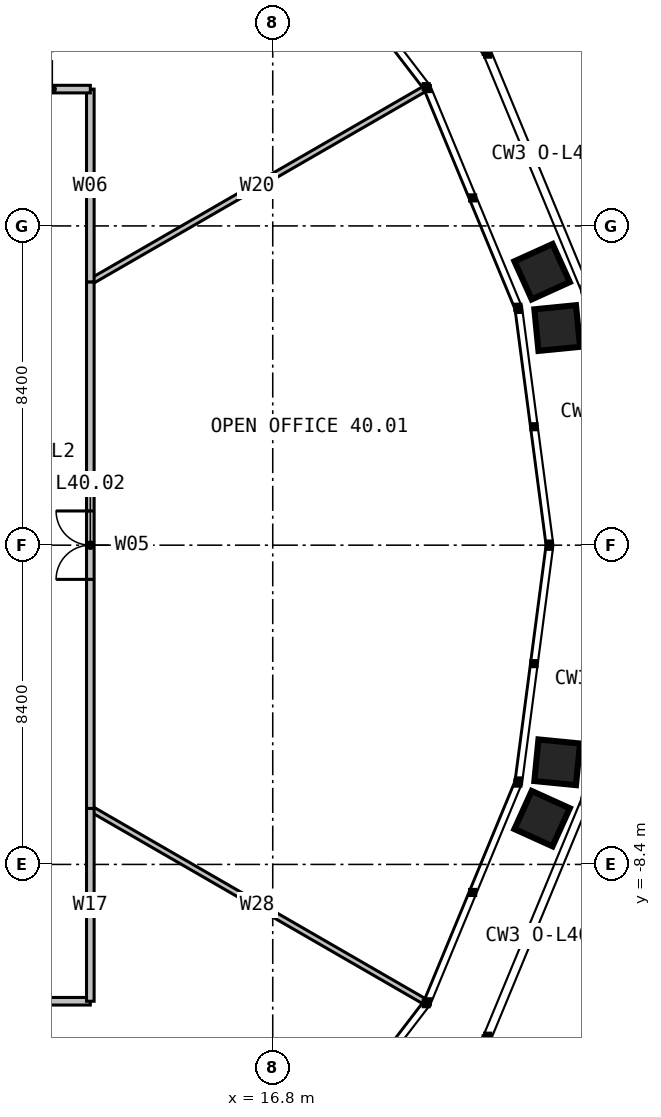
"""IFC4 building model, lengths in metres.
Left out: names, types, materials, properties, quantities, classifications, styles, units other than length and angle.
Written with IfcOpenShell. Run it as: python <this file> out.ifc"""

import sys

from ifc_helpers import new_model, si_unit, direction, frame, frame_2d, origin, place, context, subcontext, project, spatial, rectangle, extrude, element, fill, save


model = new_model("IFC4")
c1 = context("Model", 3, precision=1e-05, world=origin(), true_north=direction((0.0, 1.0)))
c2 = subcontext(c1, "Body", "Model", "MODEL_VIEW")
j1 = project(units=[si_unit("LENGTHUNIT", "METRE"), si_unit("PLANEANGLEUNIT", "RADIAN")], contexts=[c1])
p1 = place(None, origin())
s1 = spatial("IfcSite", under=j1, at=p1, CompositionType="ELEMENT")
p2 = place(p1, origin())
s2 = spatial("IfcBuilding", under=s1, at=p2, CompositionType="ELEMENT")
p3 = place(p2, frame((0.0, 0.0, 167.0)))
s3 = spatial("IfcBuildingStorey", under=s2, at=p3, CompositionType="ELEMENT", Elevation=167.0)
for number, where, z_axis, x_axis in (
    (1, (12.0, -6.928, 0.0), (0.0, 0.0, 1.0), (0.866, -0.5, 0.0)),
    (2, (12.0, 6.928, 0.0), (0.0, 0.0, 1.0), (0.866, 0.5, 0.0)),
    (3, (6.928, -12.0, 0.0), (0.0, 0.0, 1.0), (0.5, -0.866, 0.0)),
):
    element("IfcWall", number, at=place(p3, frame(where, z_axis=z_axis, x_axis=x_axis)), inside=s3, PredefinedType="PARTITIONING", context=c2, shape_type="SweptSolid", body=[
        extrude(rectangle(XDim=10.136, YDim=0.15, at=frame_2d((5.068, 0.0))), origin(), (0.0, 0.0, 1.0), 2.79),
    ])
p4 = place(p3, frame((12.0, -6.928, 0.0), z_axis=(0.0, 0.0, 1.0), x_axis=(0.0, 1.0, 0.0)))
e4 = element("IfcWall", 4, at=p4, inside=s3, PredefinedType="PARTITIONING", context=c2, shape_type="SweptSolid", body=[
    extrude(rectangle(XDim=13.856, YDim=0.2, at=frame_2d((6.928, 0.0))), origin(), (0.0, 0.0, 1.0), 3.8),
])
p5 = place(p4, frame((6.028, 0.0, 0.0)))
e5 = element("IfcOpeningElement", 5, at=p5, cuts=e4, PredefinedType="OPENING", context=c2, shape_type="SweptSolid", body=[
    extrude(rectangle(XDim=1.8, YDim=2.2, at=frame_2d((0.9, 1.1))), frame((0.0, 0.11, 0.0), z_axis=(0.0, -1.0, 0.0), x_axis=(1.0, 0.0, 0.0)), (0.0, 0.0, 1.0), 0.22),
])
p6 = place(p3, frame((12.0, 6.928, 0.0), z_axis=(0.0, 0.0, 1.0), x_axis=(0.0, 1.0, 0.0)))
e6 = element("IfcWall", 6, at=p6, inside=s3, PredefinedType="PARTITIONING", context=c2, shape_type="SweptSolid", body=[
    extrude(rectangle(XDim=5.072, YDim=0.2, at=frame_2d((2.536, 0.0))), origin(), (0.0, 0.0, 1.0), 3.8),
])
p7 = place(p3, frame((12.0, 12.0, 0.0), z_axis=(0.0, 0.0, 1.0), x_axis=(-1.0, 0.0, 0.0)))
e7 = element("IfcWall", 7, at=p7, inside=s3, PredefinedType="PARTITIONING", context=c2, shape_type="SweptSolid", body=[
    extrude(rectangle(XDim=2.0, YDim=0.2, at=frame_2d((1.0, 0.0))), origin(), (0.0, 0.0, 1.0), 3.8),
])
p8 = place(p3, frame((6.928, -12.0, 0.0), z_axis=(0.0, 0.0, 1.0), x_axis=(1.0, 0.0, 0.0)))
e8 = element("IfcWall", 8, at=p8, inside=s3, PredefinedType="PARTITIONING", context=c2, shape_type="SweptSolid", body=[
    extrude(rectangle(XDim=5.072, YDim=0.2, at=frame_2d((2.536, 0.0))), origin(), (0.0, 0.0, 1.0), 3.8),
])
p9 = place(p8, frame((1.636, 0.0, 0.0)))
e9 = element("IfcOpeningElement", 9, at=p9, cuts=e8, PredefinedType="OPENING", context=c2, shape_type="SweptSolid", body=[
    extrude(rectangle(XDim=1.8, YDim=2.2, at=frame_2d((0.9, 1.1))), frame((0.0, 0.11, 0.0), z_axis=(0.0, -1.0, 0.0), x_axis=(1.0, 0.0, 0.0)), (0.0, 0.0, 1.0), 0.22),
])
p10 = place(p3, frame((12.0, -12.0, 0.0), z_axis=(0.0, 0.0, 1.0), x_axis=(0.0, 1.0, 0.0)))
e10 = element("IfcWall", 10, at=p10, inside=s3, PredefinedType="PARTITIONING", context=c2, shape_type="SweptSolid", body=[
    extrude(rectangle(XDim=5.072, YDim=0.2, at=frame_2d((2.536, 0.0))), origin(), (0.0, 0.0, 1.0), 3.8),
])
p11 = place(p5, origin())
e11 = element("IfcDoor", 11, at=p11, inside=s3, OperationType="DOUBLE_DOOR_SINGLE_SWING", PredefinedType="DOOR", context=c2, shape_type="SweptSolid", body=[
    extrude(rectangle(XDim=1.8, YDim=2.2, at=frame_2d((0.9, 1.1))), frame((0.0, 0.025, 0.0), z_axis=(0.0, -1.0, 0.0), x_axis=(1.0, 0.0, 0.0)), (0.0, 0.0, 1.0), 0.05),
])
fill(e5, e11)
save(model, sys.argv[1])
